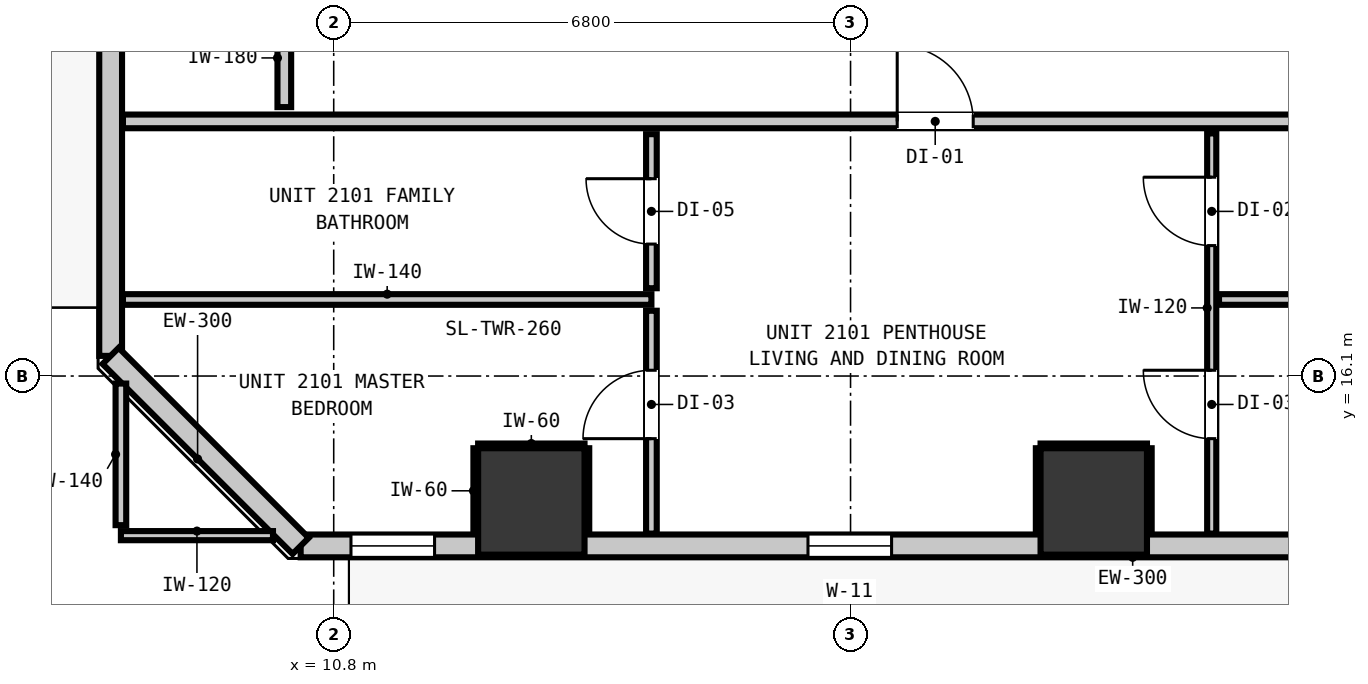
"""IFC4 building model, lengths in metres.
Left out: names, types, materials, properties, quantities, classifications, styles, units other than length and angle.
Written with IfcOpenShell. Run it as: python <this file> out.ifc"""

import sys

from ifc_helpers import new_model, si_unit, direction, frame, frame_2d, origin, origin_2d, place, context, subcontext, project, spatial, rectangle, extrude, element, fill, save


model = new_model("IFC4")
c1 = context("Model", 3, precision=1e-05, world=origin(), true_north=direction((0.0, 1.0)))
c2 = subcontext(c1, "Body", "Model", "MODEL_VIEW")
j1 = project(units=[si_unit("LENGTHUNIT", "METRE"), si_unit("PLANEANGLEUNIT", "RADIAN")], contexts=[c1])
p1 = place(None, origin())
s1 = spatial("IfcSite", under=j1, at=p1, CompositionType="ELEMENT")
p2 = place(p1, origin())
s2 = spatial("IfcBuilding", under=s1, at=p2, CompositionType="ELEMENT")
p3 = place(p2, frame((0.0, 0.0, 75.12)))
s3 = spatial("IfcBuildingStorey", under=s2, at=p3, CompositionType="ELEMENT", Elevation=75.12)
for number, where, z_axis, x_axis in (
    (1, (13.4, 14.45, 0.0), (0.0, 0.0, 1.0), (1.0, 0.0, 0.0)),
    (2, (20.8, 14.45, 0.0), (0.0, 0.0, 1.0), (1.0, 0.0, 0.0)),
):
    element("IfcColumn", number, at=place(p3, frame(where, z_axis=z_axis, x_axis=x_axis)), inside=s3, PredefinedType="COLUMN", context=c2, shape_type="SweptSolid", body=[
        extrude(rectangle(XDim=1.4, YDim=1.4, at=origin_2d()), origin(), (0.0, 0.0, 1.0), 3.32),
    ])
p4 = place(p3, frame((7.865, 16.365, 0.0), z_axis=(0.0, 0.0, 1.0), x_axis=(0.0, 1.0, 0.0)))
e3 = element("IfcWall", 3, at=p4, inside=s3, PredefinedType="STANDARD", context=c2, shape_type="SweptSolid", body=[
    extrude(rectangle(XDim=34.67, YDim=0.3, at=frame_2d((17.335, 0.0))), origin(), (0.0, 0.0, 1.0), 3.06),
])
p5 = place(p4, frame((32.419, 0.0, 0.0)))
e4 = element("IfcOpeningElement", 4, at=p5, cuts=e3, PredefinedType="OPENING", context=c2, shape_type="SweptSolid", body=[
    extrude(rectangle(XDim=1.0, YDim=2.15, at=frame_2d((0.5, 1.075))), frame((0.0, 0.16, 0.0), z_axis=(0.0, -1.0, 0.0), x_axis=(1.0, 0.0, 0.0)), (0.0, 0.0, 1.0), 0.32),
])
p6 = place(p4, frame((33.809, 0.0, 0.85)))
e5 = element("IfcOpeningElement", 5, at=p6, cuts=e3, PredefinedType="OPENING", context=c2, shape_type="SweptSolid", body=[
    extrude(rectangle(XDim=0.58, YDim=1.5, at=frame_2d((0.29, 0.75))), frame((0.0, 0.16, 0.0), z_axis=(0.0, -1.0, 0.0), x_axis=(1.0, 0.0, 0.0)), (0.0, 0.0, 1.0), 0.32),
])
p7 = place(p3, frame((47.835, 13.865, 0.0), z_axis=(0.0, 0.0, 1.0), x_axis=(-1.0, 0.0, 0.0)))
e6 = element("IfcWall", 6, at=p7, inside=s3, PredefinedType="STANDARD", context=c2, shape_type="SweptSolid", body=[
    extrude(rectangle(XDim=37.47, YDim=0.3, at=frame_2d((18.735, 0.0))), origin(), (0.0, 0.0, 1.0), 3.06),
])
p8 = place(p7, frame((0.901, 0.0, 0.0)))
e7 = element("IfcOpeningElement", 7, at=p8, cuts=e6, PredefinedType="OPENING", context=c2, shape_type="SweptSolid", body=[
    extrude(rectangle(XDim=1.0, YDim=2.15, at=frame_2d((0.5, 1.075))), frame((0.0, 0.16, 0.0), z_axis=(0.0, -1.0, 0.0), x_axis=(1.0, 0.0, 0.0)), (0.0, 0.0, 1.0), 0.32),
])
p9 = place(p7, frame((29.695, 0.0, 0.85)))
e8 = element("IfcOpeningElement", 8, at=p9, cuts=e6, PredefinedType="OPENING", context=c2, shape_type="SweptSolid", body=[
    extrude(rectangle(XDim=1.1, YDim=2.05, at=frame_2d((0.55, 1.025))), frame((0.0, 0.16, 0.0), z_axis=(0.0, -1.0, 0.0), x_axis=(1.0, 0.0, 0.0)), (0.0, 0.0, 1.0), 0.32),
])
p10 = place(p7, frame((35.708, 0.0, 0.85)))
e9 = element("IfcOpeningElement", 9, at=p10, cuts=e6, PredefinedType="OPENING", context=c2, shape_type="SweptSolid", body=[
    extrude(rectangle(XDim=1.1, YDim=2.05, at=frame_2d((0.55, 1.025))), frame((0.0, 0.16, 0.0), z_axis=(0.0, -1.0, 0.0), x_axis=(1.0, 0.0, 0.0)), (0.0, 0.0, 1.0), 0.32),
])
p11 = place(p7, frame((22.251, 0.0, 0.85)))
e10 = element("IfcOpeningElement", 10, at=p11, cuts=e6, PredefinedType="OPENING", context=c2, shape_type="SweptSolid", body=[
    extrude(rectangle(XDim=1.1, YDim=2.05, at=frame_2d((0.55, 1.025))), frame((0.0, 0.16, 0.0), z_axis=(0.0, -1.0, 0.0), x_axis=(1.0, 0.0, 0.0)), (0.0, 0.0, 1.0), 0.32),
])
p12 = place(p7, frame((15.939, 0.0, 0.85)))
e11 = element("IfcOpeningElement", 11, at=p12, cuts=e6, PredefinedType="OPENING", context=c2, shape_type="SweptSolid", body=[
    extrude(rectangle(XDim=1.1, YDim=2.05, at=frame_2d((0.55, 1.025))), frame((0.0, 0.16, 0.0), z_axis=(0.0, -1.0, 0.0), x_axis=(1.0, 0.0, 0.0)), (0.0, 0.0, 1.0), 0.32),
])
p13 = place(p7, frame((5.825, 0.0, 0.85)))
e12 = element("IfcOpeningElement", 12, at=p13, cuts=e6, PredefinedType="OPENING", context=c2, shape_type="SweptSolid", body=[
    extrude(rectangle(XDim=1.1, YDim=2.05, at=frame_2d((0.55, 1.025))), frame((0.0, 0.16, 0.0), z_axis=(0.0, -1.0, 0.0), x_axis=(1.0, 0.0, 0.0)), (0.0, 0.0, 1.0), 0.32),
])
p14 = place(p7, frame((12.889, 0.0, 0.85)))
e13 = element("IfcOpeningElement", 13, at=p14, cuts=e6, PredefinedType="OPENING", context=c2, shape_type="SweptSolid", body=[
    extrude(rectangle(XDim=1.1, YDim=2.05, at=frame_2d((0.55, 1.025))), frame((0.0, 0.16, 0.0), z_axis=(0.0, -1.0, 0.0), x_axis=(1.0, 0.0, 0.0)), (0.0, 0.0, 1.0), 0.32),
])
p15 = place(p3, frame((10.365, 13.865, 0.0), z_axis=(0.0, 0.0, 1.0), x_axis=(-0.707106781187, 0.707106781187, 0.0)))
e14 = element("IfcWall", 14, at=p15, inside=s3, PredefinedType="STANDARD", context=c2, shape_type="SweptSolid", body=[
    extrude(rectangle(XDim=3.536, YDim=0.3, at=frame_2d((1.768, 0.0))), origin(), (0.0, 0.0, 1.0), 3.06),
])
p16 = place(p3, frame((8.027, 19.45, 0.0), z_axis=(0.0, 0.0, 1.0), x_axis=(1.0, 0.0, 0.0)))
e15 = element("IfcWall", 15, at=p16, inside=s3, PredefinedType="PARTITIONING", context=c2, shape_type="SweptSolid", body=[
    extrude(rectangle(XDim=28.902, YDim=0.18, at=frame_2d((14.451, 0.0))), origin(), (0.0, 0.0, 1.0), 3.06),
])
p17 = place(p16, frame((10.187, 0.0, 0.0)))
e16 = element("IfcOpeningElement", 16, at=p17, cuts=e15, PredefinedType="OPENING", context=c2, shape_type="SweptSolid", body=[
    extrude(rectangle(XDim=1.0, YDim=2.15, at=frame_2d((0.5, 1.075))), frame((0.0, 0.1, 0.0), z_axis=(0.0, -1.0, 0.0), x_axis=(1.0, 0.0, 0.0)), (0.0, 0.0, 1.0), 0.2),
])
p18 = place(p3, frame((8.027, 17.107, 0.0), z_axis=(0.0, 0.0, 1.0), x_axis=(1.0, 0.0, 0.0)))
e17 = element("IfcWall", 17, at=p18, inside=s3, PredefinedType="PARTITIONING", context=c2, shape_type="SweptSolid", body=[
    extrude(rectangle(XDim=6.953, YDim=0.14, at=frame_2d((3.477, 0.0))), origin(), (0.0, 0.0, 1.0), 3.06),
])
p19 = place(p3, frame((22.448, 17.107, 0.0), z_axis=(0.0, 0.0, 1.0), x_axis=(1.0, 0.0, 0.0)))
e18 = element("IfcWall", 18, at=p19, inside=s3, PredefinedType="PARTITIONING", context=c2, shape_type="SweptSolid", body=[
    extrude(rectangle(XDim=15.636, YDim=0.14, at=frame_2d((7.818, 0.0))), origin(), (0.0, 0.0, 1.0), 3.06),
])
p20 = place(p3, frame((8.0, 14.0, 0.0), z_axis=(0.0, 0.0, 1.0), x_axis=(1.0, 0.0, 0.0)))
e19 = element("IfcWall", 19, at=p20, inside=s3, PredefinedType="PARTITIONING", context=c2, shape_type="SweptSolid", body=[
    extrude(rectangle(XDim=2.001, YDim=0.12, at=frame_2d((1.0, 0.0))), origin(), (0.0, 0.0, 1.0), 3.06),
])
p21 = place(p3, frame((10.15, 19.638, 0.0), z_axis=(0.0, 0.0, 1.0), x_axis=(0.0, 1.0, 0.0)))
e20 = element("IfcWall", 20, at=p21, inside=s3, PredefinedType="PARTITIONING", context=c2, shape_type="SweptSolid", body=[
    extrude(rectangle(XDim=1.294, YDim=0.18, at=frame_2d((0.647, 0.0))), origin(), (0.0, 0.0, 1.0), 2.445),
])
p22 = place(p3, frame((8.0, 14.138, 0.0), z_axis=(0.0, 0.0, 1.0), x_axis=(0.0, 1.0, 0.0)))
e21 = element("IfcWall", 21, at=p22, inside=s3, PredefinedType="PARTITIONING", context=c2, shape_type="SweptSolid", body=[
    extrude(rectangle(XDim=1.863, YDim=0.14, at=frame_2d((0.932, 0.0))), origin(), (0.0, 0.0, 1.0), 3.06),
])
p23 = place(p3, frame((14.98, 14.027, 0.0), z_axis=(0.0, 0.0, 1.0), x_axis=(0.0, 1.0, 0.0)))
e22 = element("IfcWall", 22, at=p23, inside=s3, PredefinedType="PARTITIONING", context=c2, shape_type="SweptSolid", body=[
    extrude(rectangle(XDim=2.932, YDim=0.14, at=frame_2d((1.466, 0.0))), origin(), (0.0, 0.0, 1.0), 3.06),
])
p24 = place(p23, frame((1.249, 0.0, 0.0)))
e23 = element("IfcOpeningElement", 23, at=p24, cuts=e22, PredefinedType="OPENING", context=c2, shape_type="SweptSolid", body=[
    extrude(rectangle(XDim=0.9, YDim=2.1, at=frame_2d((0.45, 1.05))), frame((0.0, 0.08, 0.0), z_axis=(0.0, -1.0, 0.0), x_axis=(1.0, 0.0, 0.0)), (0.0, 0.0, 1.0), 0.16),
])
p25 = place(p3, frame((14.98, 17.255, 0.0), z_axis=(0.0, 0.0, 1.0), x_axis=(0.0, 1.0, 0.0)))
e24 = element("IfcWall", 24, at=p25, inside=s3, PredefinedType="PARTITIONING", context=c2, shape_type="SweptSolid", body=[
    extrude(rectangle(XDim=2.027, YDim=0.14, at=frame_2d((1.014, 0.0))), origin(), (0.0, 0.0, 1.0), 3.06),
])
p26 = place(p25, frame((0.581, 0.0, 0.0)))
e25 = element("IfcOpeningElement", 25, at=p26, cuts=e24, PredefinedType="OPENING", context=c2, shape_type="SweptSolid", body=[
    extrude(rectangle(XDim=0.86, YDim=2.02, at=frame_2d((0.43, 1.01))), frame((0.0, 0.08, 0.0), z_axis=(0.0, -1.0, 0.0), x_axis=(1.0, 0.0, 0.0)), (0.0, 0.0, 1.0), 0.16),
])
p27 = place(p3, frame((22.352, 14.027, 0.0), z_axis=(0.0, 0.0, 1.0), x_axis=(0.0, 1.0, 0.0)))
e26 = element("IfcWall", 26, at=p27, inside=s3, PredefinedType="PARTITIONING", context=c2, shape_type="SweptSolid", body=[
    extrude(rectangle(XDim=5.265, YDim=0.12, at=frame_2d((2.632, 0.0))), origin(), (0.0, 0.0, 1.0), 3.06),
])
p28 = place(p27, frame((3.789, 0.0, 0.0)))
e27 = element("IfcOpeningElement", 27, at=p28, cuts=e26, PredefinedType="OPENING", context=c2, shape_type="SweptSolid", body=[
    extrude(rectangle(XDim=0.9, YDim=2.1, at=frame_2d((0.45, 1.05))), frame((0.0, 0.07, 0.0), z_axis=(0.0, -1.0, 0.0), x_axis=(1.0, 0.0, 0.0)), (0.0, 0.0, 1.0), 0.14),
])
p29 = place(p27, frame((1.249, 0.0, 0.0)))
e28 = element("IfcOpeningElement", 28, at=p29, cuts=e26, PredefinedType="OPENING", context=c2, shape_type="SweptSolid", body=[
    extrude(rectangle(XDim=0.9, YDim=2.1, at=frame_2d((0.45, 1.05))), frame((0.0, 0.07, 0.0), z_axis=(0.0, -1.0, 0.0), x_axis=(1.0, 0.0, 0.0)), (0.0, 0.0, 1.0), 0.14),
])
p30 = place(p3, frame((12.7, 15.182, 0.0), z_axis=(0.0, 0.0, 1.0), x_axis=(1.0, 0.0, 0.0)))
e29 = element("IfcWall", 29, at=p30, inside=s3, PredefinedType="PARTITIONING", context=c2, shape_type="SweptSolid", body=[
    extrude(rectangle(XDim=1.4, YDim=0.06, at=frame_2d((0.7, 0.0))), origin(), (0.0, 0.0, 1.0), 1.45),
])
for number, where, z_axis, x_axis in (
    (30, (12.668, 14.03, 0.0), (0.0, 0.0, 1.0), (0.0, 1.0, 0.0)),
    (31, (14.132, 14.03, 0.0), (0.0, 0.0, 1.0), (0.0, 1.0, 0.0)),
):
    element("IfcWall", number, at=place(p3, frame(where, z_axis=z_axis, x_axis=x_axis)), inside=s3, PredefinedType="PARTITIONING", context=c2, shape_type="SweptSolid", body=[
        extrude(rectangle(XDim=1.12, YDim=0.06, at=frame_2d((0.56, 0.0))), origin(), (0.0, 0.0, 1.0), 1.45),
    ])
p31 = place(p3, frame((20.1, 15.182, 0.0), z_axis=(0.0, 0.0, 1.0), x_axis=(1.0, 0.0, 0.0)))
e32 = element("IfcWall", 32, at=p31, inside=s3, PredefinedType="PARTITIONING", context=c2, shape_type="SweptSolid", body=[
    extrude(rectangle(XDim=1.4, YDim=0.06, at=frame_2d((0.7, 0.0))), origin(), (0.0, 0.0, 1.0), 1.45),
])
for number, where, z_axis, x_axis in (
    (33, (20.068, 14.03, 0.0), (0.0, 0.0, 1.0), (0.0, 1.0, 0.0)),
    (34, (21.532, 14.03, 0.0), (0.0, 0.0, 1.0), (0.0, 1.0, 0.0)),
):
    element("IfcWall", number, at=place(p3, frame(where, z_axis=z_axis, x_axis=x_axis)), inside=s3, PredefinedType="PARTITIONING", context=c2, shape_type="SweptSolid", body=[
        extrude(rectangle(XDim=1.12, YDim=0.06, at=frame_2d((0.56, 0.0))), origin(), (0.0, 0.0, 1.0), 1.45),
    ])
p32 = place(p9, origin())
e35 = element("IfcWindow", 35, at=p32, inside=s3, PartitioningType="SINGLE_PANEL", PredefinedType="WINDOW", context=c2, shape_type="SweptSolid", body=[
    extrude(rectangle(XDim=1.1, YDim=2.05, at=frame_2d((0.55, 1.025))), frame((0.0, 0.03, 0.0), z_axis=(0.0, -1.0, 0.0), x_axis=(1.0, 0.0, 0.0)), (0.0, 0.0, 1.0), 0.06),
])
fill(e8, e35)
p33 = place(p10, origin())
e36 = element("IfcWindow", 36, at=p33, inside=s3, PartitioningType="SINGLE_PANEL", PredefinedType="WINDOW", context=c2, shape_type="SweptSolid", body=[
    extrude(rectangle(XDim=1.1, YDim=2.05, at=frame_2d((0.55, 1.025))), frame((0.0, 0.03, 0.0), z_axis=(0.0, -1.0, 0.0), x_axis=(1.0, 0.0, 0.0)), (0.0, 0.0, 1.0), 0.06),
])
fill(e9, e36)
p34 = place(p17, origin())
e37 = element("IfcDoor", 37, at=p34, inside=s3, OperationType="SINGLE_SWING_LEFT", PredefinedType="DOOR", context=c2, shape_type="SweptSolid", body=[
    extrude(rectangle(XDim=1.0, YDim=2.15, at=frame_2d((0.5, 1.075))), frame((0.0, 0.025, 0.0), z_axis=(0.0, -1.0, 0.0), x_axis=(1.0, 0.0, 0.0)), (0.0, 0.0, 1.0), 0.05),
])
fill(e16, e37)
p35 = place(p26, origin())
e38 = element("IfcDoor", 38, at=p35, inside=s3, OperationType="SINGLE_SWING_RIGHT", PredefinedType="DOOR", context=c2, shape_type="SweptSolid", body=[
    extrude(rectangle(XDim=0.86, YDim=2.02, at=frame_2d((0.43, 1.01))), frame((0.0, 0.025, 0.0), z_axis=(0.0, -1.0, 0.0), x_axis=(1.0, 0.0, 0.0)), (0.0, 0.0, 1.0), 0.05),
])
fill(e25, e38)
p36 = place(p24, origin())
e39 = element("IfcDoor", 39, at=p36, inside=s3, OperationType="SINGLE_SWING_LEFT", PredefinedType="DOOR", context=c2, shape_type="SweptSolid", body=[
    extrude(rectangle(XDim=0.9, YDim=2.1, at=frame_2d((0.45, 1.05))), frame((0.0, 0.025, 0.0), z_axis=(0.0, -1.0, 0.0), x_axis=(1.0, 0.0, 0.0)), (0.0, 0.0, 1.0), 0.05),
])
fill(e23, e39)
p37 = place(p28, origin())
e40 = element("IfcDoor", 40, at=p37, inside=s3, OperationType="SINGLE_SWING_RIGHT", PredefinedType="DOOR", context=c2, shape_type="SweptSolid", body=[
    extrude(rectangle(XDim=0.9, YDim=2.1, at=frame_2d((0.45, 1.05))), frame((0.0, 0.025, 0.0), z_axis=(0.0, -1.0, 0.0), x_axis=(1.0, 0.0, 0.0)), (0.0, 0.0, 1.0), 0.05),
])
fill(e27, e40)
p38 = place(p29, origin())
e41 = element("IfcDoor", 41, at=p38, inside=s3, OperationType="SINGLE_SWING_RIGHT", PredefinedType="DOOR", context=c2, shape_type="SweptSolid", body=[
    extrude(rectangle(XDim=0.9, YDim=2.1, at=frame_2d((0.45, 1.05))), frame((0.0, 0.025, 0.0), z_axis=(0.0, -1.0, 0.0), x_axis=(1.0, 0.0, 0.0)), (0.0, 0.0, 1.0), 0.05),
])
fill(e28, e41)
save(model, sys.argv[1])
